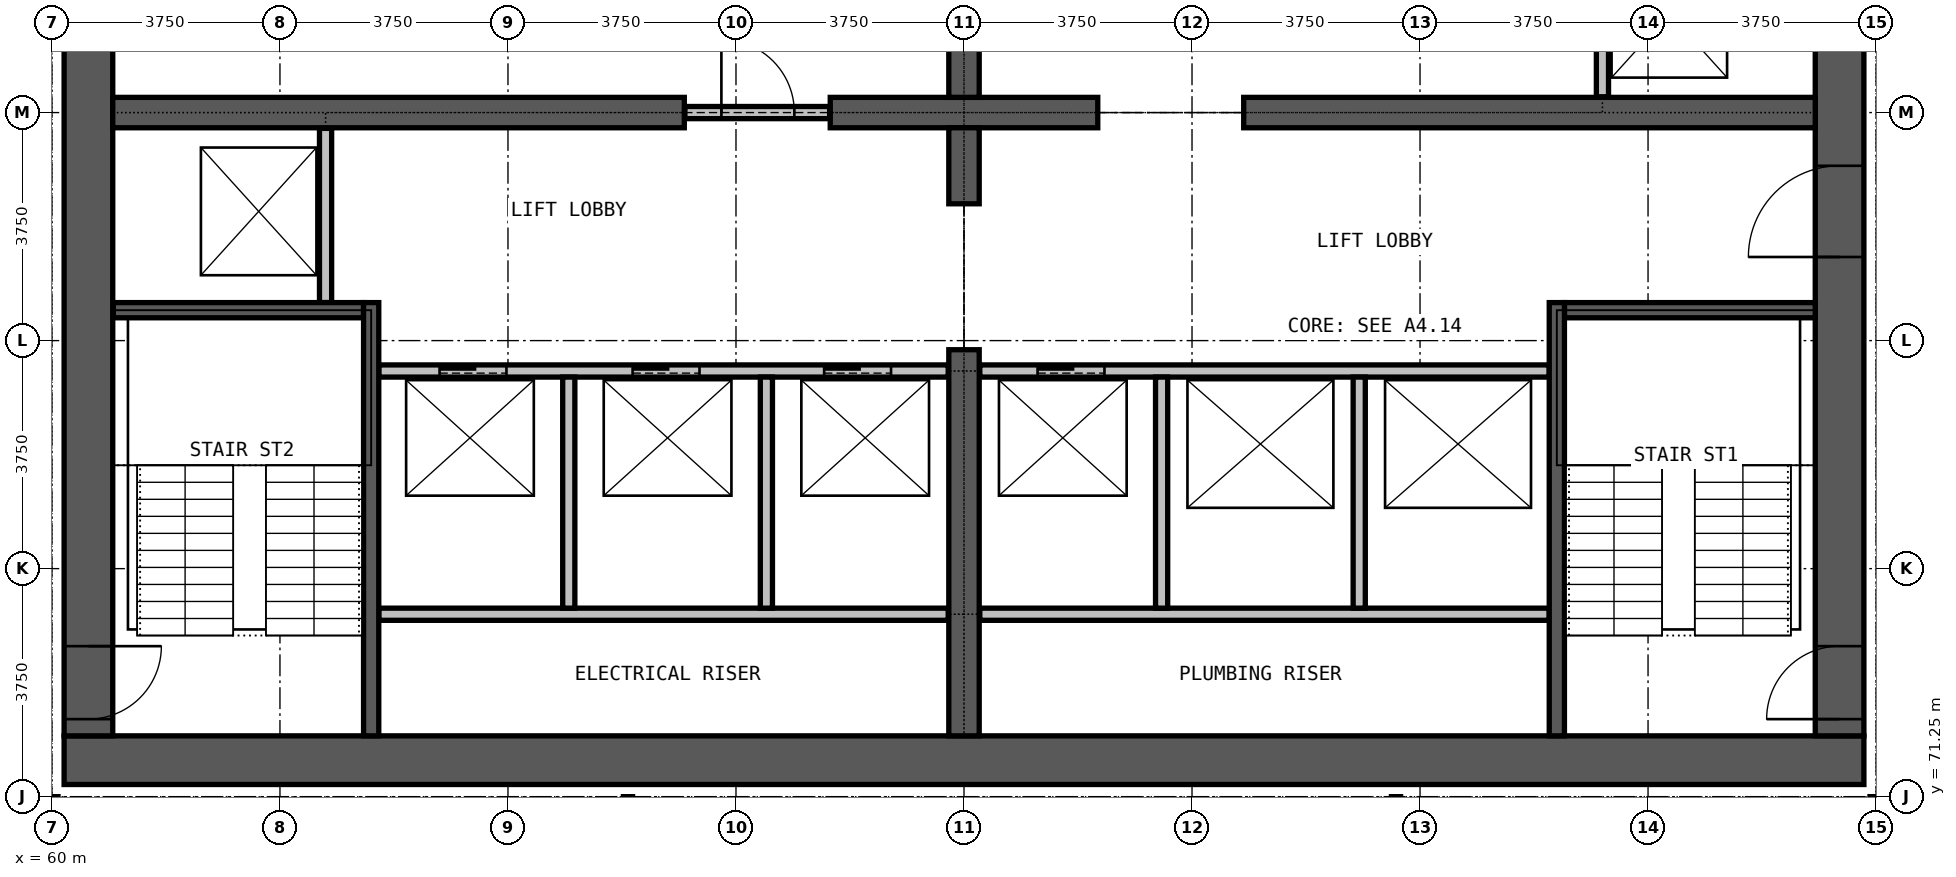
"""IFC4 building model, lengths in metres.
Left out: names, types, materials, properties, quantities, classifications, styles, units other than length and angle.
Written with IfcOpenShell. Run it as: python <this file> out.ifc"""

import sys

from ifc_helpers import new_model, si_unit, direction, frame, frame_2d, origin, place, context, subcontext, project, spatial, rectangle, extrude, element, fill, save


model = new_model("IFC4")
c1 = context("Model", 3, precision=1e-05, world=origin(), true_north=direction((0.0, 1.0)))
c2 = subcontext(c1, "Body", "Model", "MODEL_VIEW")
j1 = project(units=[si_unit("LENGTHUNIT", "METRE"), si_unit("PLANEANGLEUNIT", "RADIAN")], contexts=[c1])
p1 = place(None, origin())
s1 = spatial("IfcSite", under=j1, at=p1, CompositionType="ELEMENT")
p2 = place(p1, origin())
s2 = spatial("IfcBuilding", under=s1, at=p2, CompositionType="ELEMENT")
p3 = place(p2, frame((0.0, 0.0, 139.6)))
s3 = spatial("IfcBuildingStorey", under=s2, at=p3, CompositionType="ELEMENT", Elevation=139.6)
p4 = place(p3, frame((60.2, 71.85, 0.0), z_axis=(0.0, 0.0, 1.0), x_axis=(1.0, 0.0, 0.0)))
e1 = element("IfcWall", 1, at=p4, inside=s3, PredefinedType="SHEAR", context=c2, shape_type="SweptSolid", body=[
    extrude(rectangle(XDim=29.6, YDim=0.8, at=frame_2d((14.8, 0.0))), origin(), (0.0, 0.0, 1.0), 3.6),
])
p5 = place(p3, frame((89.4, 72.25, 0.0), z_axis=(0.0, 0.0, 1.0), x_axis=(0.0, 1.0, 0.0)))
e2 = element("IfcWall", 2, at=p5, inside=s3, PredefinedType="SHEAR", context=c2, shape_type="SweptSolid", body=[
    extrude(rectangle(XDim=20.5, YDim=0.8, at=frame_2d((10.25, 0.0))), origin(), (0.0, 0.0, 1.0), 3.6),
])
p6 = place(p5, frame((0.275, 0.0, 0.0)))
e3 = element("IfcOpeningElement", 3, at=p6, cuts=e2, PredefinedType="OPENING", context=c2, shape_type="SweptSolid", body=[
    extrude(rectangle(XDim=1.2, YDim=2.2, at=frame_2d((0.6, 1.1))), frame((0.0, 0.41, 0.0), z_axis=(0.0, -1.0, 0.0), x_axis=(1.0, 0.0, 0.0)), (0.0, 0.0, 1.0), 0.82),
])
p7 = place(p5, frame((13.775, 0.0, 0.0)))
e4 = element("IfcOpeningElement", 4, at=p7, cuts=e2, PredefinedType="OPENING", context=c2, shape_type="SweptSolid", body=[
    extrude(rectangle(XDim=1.2, YDim=2.2, at=frame_2d((0.6, 1.1))), frame((0.0, 0.41, 0.0), z_axis=(0.0, -1.0, 0.0), x_axis=(1.0, 0.0, 0.0)), (0.0, 0.0, 1.0), 0.82),
])
p8 = place(p5, frame((7.875, 0.0, 0.0)))
e5 = element("IfcOpeningElement", 5, at=p8, cuts=e2, PredefinedType="OPENING", context=c2, shape_type="SweptSolid", body=[
    extrude(rectangle(XDim=1.5, YDim=2.2, at=frame_2d((0.75, 1.1))), frame((0.0, 0.41, 0.0), z_axis=(0.0, -1.0, 0.0), x_axis=(1.0, 0.0, 0.0)), (0.0, 0.0, 1.0), 0.82),
])
p9 = place(p3, frame((60.6, 92.75, 0.0), z_axis=(0.0, 0.0, 1.0), x_axis=(0.0, -1.0, 0.0)))
e6 = element("IfcWall", 6, at=p9, inside=s3, PredefinedType="SHEAR", context=c2, shape_type="SweptSolid", body=[
    extrude(rectangle(XDim=20.5, YDim=0.8, at=frame_2d((10.25, 0.0))), origin(), (0.0, 0.0, 1.0), 3.6),
])
p10 = place(p9, frame((19.025, 0.0, 0.0)))
e7 = element("IfcOpeningElement", 7, at=p10, cuts=e6, PredefinedType="OPENING", context=c2, shape_type="SweptSolid", body=[
    extrude(rectangle(XDim=1.2, YDim=2.2, at=frame_2d((0.6, 1.1))), frame((0.0, 0.41, 0.0), z_axis=(0.0, -1.0, 0.0), x_axis=(1.0, 0.0, 0.0)), (0.0, 0.0, 1.0), 0.82),
])
p11 = place(p9, frame((8.025, 0.0, 0.0)))
e8 = element("IfcOpeningElement", 8, at=p11, cuts=e6, PredefinedType="OPENING", context=c2, shape_type="SweptSolid", body=[
    extrude(rectangle(XDim=1.2, YDim=2.2, at=frame_2d((0.6, 1.1))), frame((0.0, 0.41, 0.0), z_axis=(0.0, -1.0, 0.0), x_axis=(1.0, 0.0, 0.0)), (0.0, 0.0, 1.0), 0.82),
])
p12 = place(p3, frame((61.0, 82.5, 0.0), z_axis=(0.0, 0.0, 1.0), x_axis=(1.0, 0.0, 0.0)))
e9 = element("IfcWall", 9, at=p12, inside=s3, PredefinedType="SHEAR", context=c2, shape_type="SweptSolid", body=[
    extrude(rectangle(XDim=9.4, YDim=0.5, at=frame_2d((4.7, 0.0))), origin(), (0.0, 0.0, 1.0), 3.6),
])
p13 = place(p3, frame((72.8, 82.5, 0.0), z_axis=(0.0, 0.0, 1.0), x_axis=(1.0, 0.0, 0.0)))
e10 = element("IfcWall", 10, at=p13, inside=s3, PredefinedType="SHEAR", context=c2, shape_type="SweptSolid", body=[
    extrude(rectangle(XDim=4.4, YDim=0.5, at=frame_2d((2.2, 0.0))), origin(), (0.0, 0.0, 1.0), 3.6),
])
p14 = place(p3, frame((79.6, 82.5, 0.0), z_axis=(0.0, 0.0, 1.0), x_axis=(1.0, 0.0, 0.0)))
e11 = element("IfcWall", 11, at=p14, inside=s3, PredefinedType="SHEAR", context=c2, shape_type="SweptSolid", body=[
    extrude(rectangle(XDim=9.4, YDim=0.5, at=frame_2d((4.7, 0.0))), origin(), (0.0, 0.0, 1.0), 3.6),
])
p15 = place(p3, frame((75.0, 72.25, 0.0), z_axis=(0.0, 0.0, 1.0), x_axis=(0.0, 1.0, 0.0)))
e12 = element("IfcWall", 12, at=p15, inside=s3, PredefinedType="SHEAR", context=c2, shape_type="SweptSolid", body=[
    extrude(rectangle(XDim=6.35, YDim=0.5, at=frame_2d((3.175, 0.0))), origin(), (0.0, 0.0, 1.0), 3.6),
])
for number, where, z_axis, x_axis in (
    (13, (75.0, 81.0, 0.0), (0.0, 0.0, 1.0), (0.0, 1.0, 0.0)),
    (14, (75.0, 82.75, 0.0), (0.0, 0.0, 1.0), (0.0, 1.0, 0.0)),
):
    element("IfcWall", number, at=place(p3, frame(where, z_axis=z_axis, x_axis=x_axis)), inside=s3, PredefinedType="SHEAR", context=c2, shape_type="SweptSolid", body=[
        extrude(rectangle(XDim=1.25, YDim=0.5, at=frame_2d((0.625, 0.0))), origin(), (0.0, 0.0, 1.0), 3.6),
    ])
p16 = place(p3, frame((70.41, 82.5, 0.0), z_axis=(0.0, 0.0, 1.0), x_axis=(1.0, 0.0, 0.0)))
e15 = element("IfcWall", 15, at=p16, inside=s3, PredefinedType="PARTITIONING", context=c2, shape_type="SweptSolid", body=[
    extrude(rectangle(XDim=2.38, YDim=0.2, at=frame_2d((1.19, 0.0))), origin(), (0.0, 0.0, 1.0), 2.4),
])
p17 = place(p16, frame((0.6, 0.0, 0.0)))
e16 = element("IfcOpeningElement", 16, at=p17, cuts=e15, PredefinedType="OPENING", context=c2, shape_type="SweptSolid", body=[
    extrude(rectangle(XDim=1.2, YDim=2.2, at=frame_2d((0.6, 1.1))), frame((0.0, 0.11, 0.0), z_axis=(0.0, -1.0, 0.0), x_axis=(1.0, 0.0, 0.0)), (0.0, 0.0, 1.0), 0.22),
])
for number, where, z_axis, x_axis in (
    (17, (65.375, 74.25, 0.0), (0.0, 0.0, 1.0), (1.0, 0.0, 0.0)),
    (18, (75.26, 74.25, 0.0), (0.0, 0.0, 1.0), (1.0, 0.0, 0.0)),
):
    element("IfcWall", number, at=place(p3, frame(where, z_axis=z_axis, x_axis=x_axis)), inside=s3, PredefinedType="PARTITIONING", context=c2, shape_type="SweptSolid", body=[
        extrude(rectangle(XDim=9.365, YDim=0.2, at=frame_2d((4.683, 0.0))), origin(), (0.0, 0.0, 1.0), 3.3),
    ])
p18 = place(p3, frame((65.375, 78.25, 0.0), z_axis=(0.0, 0.0, 1.0), x_axis=(1.0, 0.0, 0.0)))
e19 = element("IfcWall", 19, at=p18, inside=s3, PredefinedType="PARTITIONING", context=c2, shape_type="SweptSolid", body=[
    extrude(rectangle(XDim=9.365, YDim=0.2, at=frame_2d((4.683, 0.0))), origin(), (0.0, 0.0, 1.0), 3.3),
])
p19 = place(p18, frame((1.0, 0.0, 0.0)))
e20 = element("IfcOpeningElement", 20, at=p19, cuts=e19, PredefinedType="OPENING", context=c2, shape_type="SweptSolid", body=[
    extrude(rectangle(XDim=1.1, YDim=2.2, at=frame_2d((0.55, 1.1))), frame((0.0, 0.11, 0.0), z_axis=(0.0, -1.0, 0.0), x_axis=(1.0, 0.0, 0.0)), (0.0, 0.0, 1.0), 0.22),
])
p20 = place(p18, frame((4.175, 0.0, 0.0)))
e21 = element("IfcOpeningElement", 21, at=p20, cuts=e19, PredefinedType="OPENING", context=c2, shape_type="SweptSolid", body=[
    extrude(rectangle(XDim=1.1, YDim=2.2, at=frame_2d((0.55, 1.1))), frame((0.0, 0.11, 0.0), z_axis=(0.0, -1.0, 0.0), x_axis=(1.0, 0.0, 0.0)), (0.0, 0.0, 1.0), 0.22),
])
p21 = place(p18, frame((7.325, 0.0, 0.0)))
e22 = element("IfcOpeningElement", 22, at=p21, cuts=e19, PredefinedType="OPENING", context=c2, shape_type="SweptSolid", body=[
    extrude(rectangle(XDim=1.1, YDim=2.2, at=frame_2d((0.55, 1.1))), frame((0.0, 0.11, 0.0), z_axis=(0.0, -1.0, 0.0), x_axis=(1.0, 0.0, 0.0)), (0.0, 0.0, 1.0), 0.22),
])
p22 = place(p3, frame((75.26, 78.25, 0.0), z_axis=(0.0, 0.0, 1.0), x_axis=(1.0, 0.0, 0.0)))
e23 = element("IfcWall", 23, at=p22, inside=s3, PredefinedType="PARTITIONING", context=c2, shape_type="SweptSolid", body=[
    extrude(rectangle(XDim=9.365, YDim=0.2, at=frame_2d((4.683, 0.0))), origin(), (0.0, 0.0, 1.0), 3.3),
])
p23 = place(p22, frame((0.95, 0.0, 0.0)))
e24 = element("IfcOpeningElement", 24, at=p23, cuts=e23, PredefinedType="OPENING", context=c2, shape_type="SweptSolid", body=[
    extrude(rectangle(XDim=1.1, YDim=2.2, at=frame_2d((0.55, 1.1))), frame((0.0, 0.11, 0.0), z_axis=(0.0, -1.0, 0.0), x_axis=(1.0, 0.0, 0.0)), (0.0, 0.0, 1.0), 0.22),
])
p24 = place(p3, frame((64.5, 79.375, 0.0), z_axis=(0.0, 0.0, 1.0), x_axis=(0.0, 1.0, 0.0)))
e25 = element("IfcWall", 25, at=p24, inside=s3, PredefinedType="PARTITIONING", context=c2, shape_type="SweptSolid", body=[
    extrude(rectangle(XDim=2.865, YDim=0.2, at=frame_2d((1.433, 0.0))), origin(), (0.0, 0.0, 1.0), 3.3),
])
for number, where, z_axis, x_axis in (
    (26, (68.5, 74.35, 0.0), (0.0, 0.0, 1.0), (0.0, 1.0, 0.0)),
    (27, (71.75, 74.35, 0.0), (0.0, 0.0, 1.0), (0.0, 1.0, 0.0)),
    (28, (78.25, 74.35, 0.0), (0.0, 0.0, 1.0), (0.0, 1.0, 0.0)),
    (29, (81.5, 74.35, 0.0), (0.0, 0.0, 1.0), (0.0, 1.0, 0.0)),
):
    element("IfcWall", number, at=place(p3, frame(where, z_axis=z_axis, x_axis=x_axis)), inside=s3, PredefinedType="PARTITIONING", context=c2, shape_type="SweptSolid", body=[
        extrude(rectangle(XDim=3.8, YDim=0.2, at=frame_2d((1.9, 0.0))), origin(), (0.0, 0.0, 1.0), 3.3),
    ])
p25 = place(p3, frame((85.5, 82.76, 0.0), z_axis=(0.0, 0.0, 1.0), x_axis=(0.0, 1.0, 0.0)))
e30 = element("IfcWall", 30, at=p25, inside=s3, PredefinedType="PARTITIONING", context=c2, shape_type="SweptSolid", body=[
    extrude(rectangle(XDim=2.865, YDim=0.2, at=frame_2d((1.433, 0.0))), origin(), (0.0, 0.0, 1.0), 3.3),
])
p26 = place(p3, frame((61.01, 79.25, 0.0), z_axis=(0.0, 0.0, 1.0), x_axis=(1.0, 0.0, 0.0)))
e31 = element("IfcWall", 31, at=p26, inside=s3, PredefinedType="PARTITIONING", context=c2, shape_type="SweptSolid", body=[
    extrude(rectangle(XDim=4.115, YDim=0.25, at=frame_2d((2.058, 0.0))), origin(), (0.0, 0.0, 1.0), 3.3),
])
p27 = place(p3, frame((84.875, 79.25, 0.0), z_axis=(0.0, 0.0, 1.0), x_axis=(1.0, 0.0, 0.0)))
e32 = element("IfcWall", 32, at=p27, inside=s3, PredefinedType="PARTITIONING", context=c2, shape_type="SweptSolid", body=[
    extrude(rectangle(XDim=4.125, YDim=0.25, at=frame_2d((2.062, 0.0))), origin(), (0.0, 0.0, 1.0), 3.3),
])
for number, where, z_axis, x_axis in (
    (33, (65.25, 72.25, 0.0), (0.0, 0.0, 1.0), (0.0, 1.0, 0.0)),
    (34, (84.75, 72.25, 0.0), (0.0, 0.0, 1.0), (0.0, 1.0, 0.0)),
):
    element("IfcWall", number, at=place(p3, frame(where, z_axis=z_axis, x_axis=x_axis)), inside=s3, PredefinedType="PARTITIONING", context=c2, shape_type="SweptSolid", body=[
        extrude(rectangle(XDim=7.125, YDim=0.25, at=frame_2d((3.562, 0.0))), origin(), (0.0, 0.0, 1.0), 3.3),
    ])
p28 = place(p19, origin())
e35 = element("IfcDoor", 35, at=p28, inside=s3, OperationType="DOUBLE_DOOR_SLIDING", PredefinedType="DOOR", context=c2, shape_type="SweptSolid", body=[
    extrude(rectangle(XDim=1.1, YDim=2.2, at=frame_2d((0.55, 1.1))), frame((0.0, 0.025, 0.0), z_axis=(0.0, -1.0, 0.0), x_axis=(1.0, 0.0, 0.0)), (0.0, 0.0, 1.0), 0.05),
])
fill(e20, e35)
p29 = place(p20, origin())
e36 = element("IfcDoor", 36, at=p29, inside=s3, OperationType="DOUBLE_DOOR_SLIDING", PredefinedType="DOOR", context=c2, shape_type="SweptSolid", body=[
    extrude(rectangle(XDim=1.1, YDim=2.2, at=frame_2d((0.55, 1.1))), frame((0.0, 0.025, 0.0), z_axis=(0.0, -1.0, 0.0), x_axis=(1.0, 0.0, 0.0)), (0.0, 0.0, 1.0), 0.05),
])
fill(e21, e36)
p30 = place(p21, origin())
e37 = element("IfcDoor", 37, at=p30, inside=s3, OperationType="DOUBLE_DOOR_SLIDING", PredefinedType="DOOR", context=c2, shape_type="SweptSolid", body=[
    extrude(rectangle(XDim=1.1, YDim=2.2, at=frame_2d((0.55, 1.1))), frame((0.0, 0.025, 0.0), z_axis=(0.0, -1.0, 0.0), x_axis=(1.0, 0.0, 0.0)), (0.0, 0.0, 1.0), 0.05),
])
fill(e22, e37)
p31 = place(p23, origin())
e38 = element("IfcDoor", 38, at=p31, inside=s3, OperationType="DOUBLE_DOOR_SLIDING", PredefinedType="DOOR", context=c2, shape_type="SweptSolid", body=[
    extrude(rectangle(XDim=1.1, YDim=2.2, at=frame_2d((0.55, 1.1))), frame((0.0, 0.025, 0.0), z_axis=(0.0, -1.0, 0.0), x_axis=(1.0, 0.0, 0.0)), (0.0, 0.0, 1.0), 0.05),
])
fill(e24, e38)
p32 = place(p17, origin())
e39 = element("IfcDoor", 39, at=p32, inside=s3, OperationType="SINGLE_SWING_RIGHT", PredefinedType="DOOR", context=c2, shape_type="SweptSolid", body=[
    extrude(rectangle(XDim=1.2, YDim=2.2, at=frame_2d((0.6, 1.1))), frame((0.0, 0.025, 0.0), z_axis=(0.0, -1.0, 0.0), x_axis=(1.0, 0.0, 0.0)), (0.0, 0.0, 1.0), 0.05),
])
fill(e16, e39)
p33 = place(p6, origin())
e40 = element("IfcDoor", 40, at=p33, inside=s3, OperationType="SINGLE_SWING_RIGHT", PredefinedType="DOOR", context=c2, shape_type="SweptSolid", body=[
    extrude(rectangle(XDim=1.2, YDim=2.2, at=frame_2d((0.6, 1.1))), frame((0.0, 0.025, 0.0), z_axis=(0.0, -1.0, 0.0), x_axis=(1.0, 0.0, 0.0)), (0.0, 0.0, 1.0), 0.05),
])
fill(e3, e40)
p34 = place(p10, origin())
e41 = element("IfcDoor", 41, at=p34, inside=s3, OperationType="SINGLE_SWING_RIGHT", PredefinedType="DOOR", context=c2, shape_type="SweptSolid", body=[
    extrude(rectangle(XDim=1.2, YDim=2.2, at=frame_2d((0.6, 1.1))), frame((0.0, 0.025, 0.0), z_axis=(0.0, -1.0, 0.0), x_axis=(1.0, 0.0, 0.0)), (0.0, 0.0, 1.0), 0.05),
])
fill(e7, e41)
p35 = place(p8, origin())
e42 = element("IfcDoor", 42, at=p35, inside=s3, OperationType="DOUBLE_DOOR_SINGLE_SWING", PredefinedType="DOOR", context=c2, shape_type="SweptSolid", body=[
    extrude(rectangle(XDim=1.5, YDim=2.2, at=frame_2d((0.75, 1.1))), frame((0.0, 0.025, 0.0), z_axis=(0.0, -1.0, 0.0), x_axis=(1.0, 0.0, 0.0)), (0.0, 0.0, 1.0), 0.05),
])
fill(e5, e42)
save(model, sys.argv[1])
